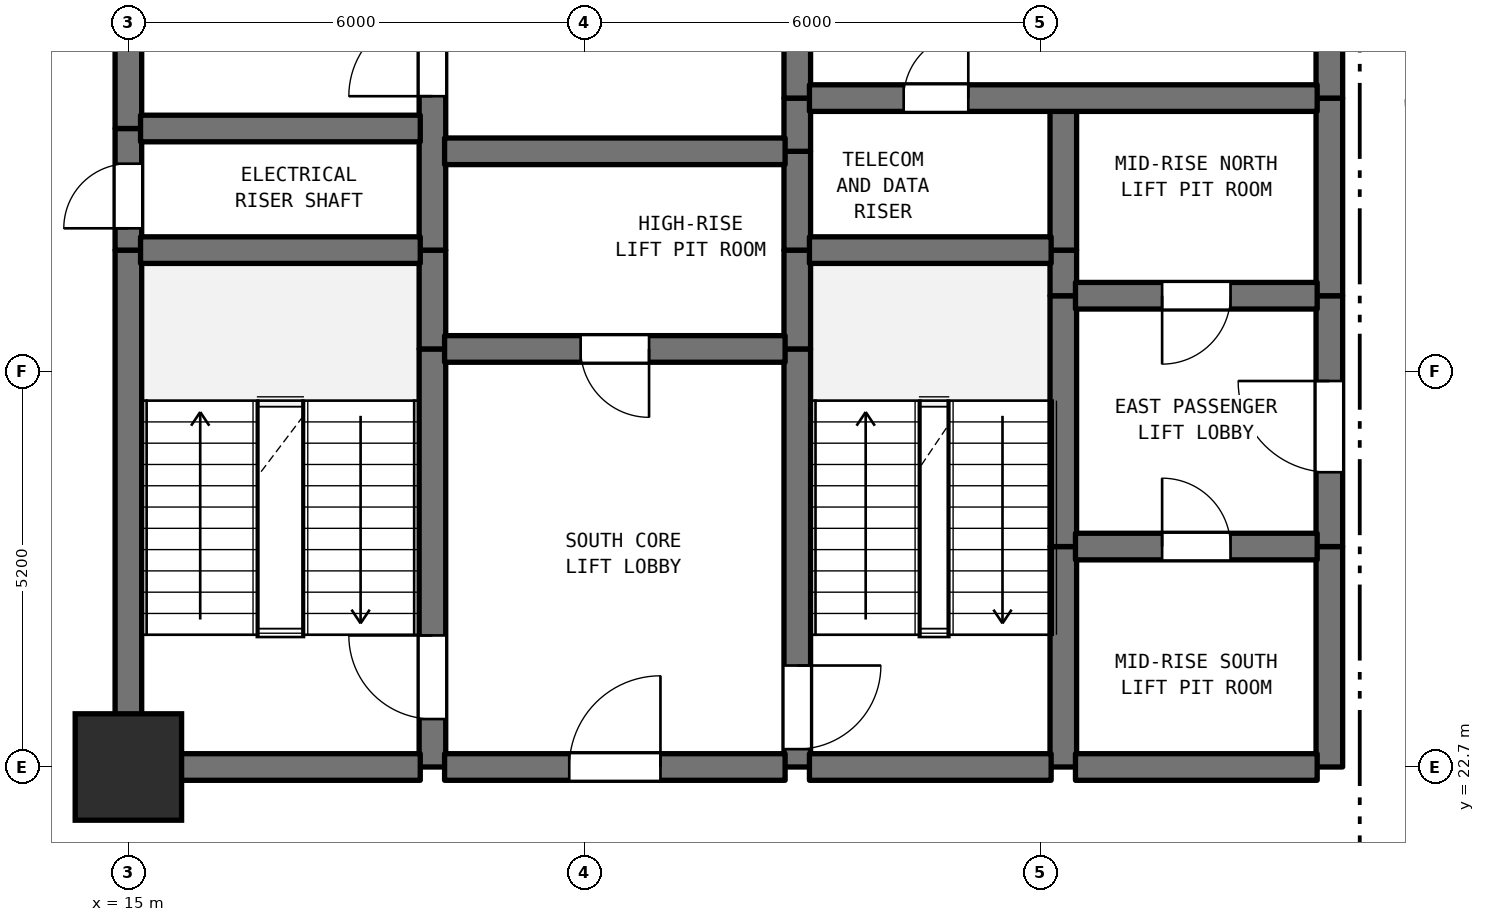
"""IFC4 building model, lengths in metres.
Left out: names, types, materials, properties, quantities, classifications, styles, units other than length and angle.
Written with IfcOpenShell. Run it as: python <this file> out.ifc"""

import sys

from ifc_helpers import new_model, si_unit, direction, frame, frame_2d, origin, origin_2d, place, context, subcontext, project, spatial, rectangle, extrude, element, fill, save


model = new_model("IFC4")
c1 = context("Model", 3, precision=1e-05, world=origin(), true_north=direction((0.0, 1.0)))
c2 = subcontext(c1, "Body", "Model", "MODEL_VIEW")
j1 = project(units=[si_unit("LENGTHUNIT", "METRE"), si_unit("PLANEANGLEUNIT", "RADIAN")], contexts=[c1])
p1 = place(None, origin())
s1 = spatial("IfcSite", under=j1, at=p1, CompositionType="ELEMENT")
p2 = place(p1, origin())
s2 = spatial("IfcBuilding", under=s1, at=p2, CompositionType="ELEMENT")
p3 = place(p2, frame((0.0, 0.0, -4.5)))
s3 = spatial("IfcBuildingStorey", under=s2, at=p3, CompositionType="ELEMENT", Elevation=-4.5)
p4 = place(p3, frame((15.0, 22.7, 0.0), z_axis=(0.0, 0.0, 1.0), x_axis=(1.0, 0.0, 0.0)))
e1 = element("IfcColumn", 1, at=p4, inside=s3, PredefinedType="COLUMN", context=c2, shape_type="SweptSolid", body=[
    extrude(rectangle(XDim=1.4, YDim=1.4, at=origin_2d()), origin(), (0.0, 0.0, 1.0), 4.5),
])
p5 = place(p3, frame((15.0, 22.7, 0.0), z_axis=(0.0, 0.0, 1.0), x_axis=(0.0, 1.0, 0.0)))
e2 = element("IfcWall", 2, at=p5, inside=s3, PredefinedType="SHEAR", context=c2, shape_type="SweptSolid", body=[
    extrude(rectangle(XDim=6.8, YDim=0.35, at=frame_2d((3.4, 0.0))), origin(), (0.0, 0.0, 1.0), 4.1),
])
p6 = place(p3, frame((15.0, 29.5, 0.0), z_axis=(0.0, 0.0, 1.0), x_axis=(0.0, 1.0, 0.0)))
e3 = element("IfcWall", 3, at=p6, inside=s3, PredefinedType="SHEAR", context=c2, shape_type="SweptSolid", body=[
    extrude(rectangle(XDim=1.6, YDim=0.35, at=frame_2d((0.8, 0.0))), origin(), (0.0, 0.0, 1.0), 4.1),
])
p7 = place(p6, frame((0.287, 0.0, 0.0)))
e4 = element("IfcOpeningElement", 4, at=p7, cuts=e3, PredefinedType="OPENING", context=c2, shape_type="SweptSolid", body=[
    extrude(rectangle(XDim=0.85, YDim=2.1, at=frame_2d((0.425, 1.05))), frame((0.0, 0.185, 0.0), z_axis=(0.0, -1.0, 0.0), x_axis=(1.0, 0.0, 0.0)), (0.0, 0.0, 1.0), 0.37),
])
p8 = place(p3, frame((15.0, 31.1, 0.0), z_axis=(0.0, 0.0, 1.0), x_axis=(0.0, 1.0, 0.0)))
e5 = element("IfcWall", 5, at=p8, inside=s3, PredefinedType="SHEAR", context=c2, shape_type="SweptSolid", body=[
    extrude(rectangle(XDim=6.8, YDim=0.35, at=frame_2d((3.4, 0.0))), origin(), (0.0, 0.0, 1.0), 4.1),
])
p9 = place(p3, frame((19.0, 22.7, 0.0), z_axis=(0.0, 0.0, 1.0), x_axis=(0.0, 1.0, 0.0)))
e6 = element("IfcWall", 6, at=p9, inside=s3, PredefinedType="SHEAR", context=c2, shape_type="SweptSolid", body=[
    extrude(rectangle(XDim=5.5, YDim=0.35, at=frame_2d((2.75, 0.0))), origin(), (0.0, 0.0, 1.0), 4.1),
])
p10 = place(p9, frame((0.631, 0.0, 0.0)))
e7 = element("IfcOpeningElement", 7, at=p10, cuts=e6, PredefinedType="OPENING", context=c2, shape_type="SweptSolid", body=[
    extrude(rectangle(XDim=1.1, YDim=2.15, at=frame_2d((0.55, 1.075))), frame((0.0, 0.185, 0.0), z_axis=(0.0, -1.0, 0.0), x_axis=(1.0, 0.0, 0.0)), (0.0, 0.0, 1.0), 0.37),
])
p11 = place(p3, frame((19.0, 28.2, 0.0), z_axis=(0.0, 0.0, 1.0), x_axis=(0.0, 1.0, 0.0)))
e8 = element("IfcWall", 8, at=p11, inside=s3, PredefinedType="SHEAR", context=c2, shape_type="SweptSolid", body=[
    extrude(rectangle(XDim=1.3, YDim=0.35, at=frame_2d((0.65, 0.0))), origin(), (0.0, 0.0, 1.0), 4.1),
])
p12 = place(p3, frame((19.0, 29.5, 0.0), z_axis=(0.0, 0.0, 1.0), x_axis=(0.0, 1.0, 0.0)))
e9 = element("IfcWall", 9, at=p12, inside=s3, PredefinedType="SHEAR", context=c2, shape_type="SweptSolid", body=[
    extrude(rectangle(XDim=5.5, YDim=0.35, at=frame_2d((2.75, 0.0))), origin(), (0.0, 0.0, 1.0), 4.1),
])
p13 = place(p12, frame((2.025, 0.0, 0.0)))
e10 = element("IfcOpeningElement", 10, at=p13, cuts=e9, PredefinedType="OPENING", context=c2, shape_type="SweptSolid", body=[
    extrude(rectangle(XDim=1.1, YDim=2.15, at=frame_2d((0.55, 1.075))), frame((0.0, 0.185, 0.0), z_axis=(0.0, -1.0, 0.0), x_axis=(1.0, 0.0, 0.0)), (0.0, 0.0, 1.0), 0.37),
])
p14 = place(p3, frame((23.8, 22.7, 0.0), z_axis=(0.0, 0.0, 1.0), x_axis=(0.0, 1.0, 0.0)))
e11 = element("IfcWall", 11, at=p14, inside=s3, PredefinedType="SHEAR", context=c2, shape_type="SweptSolid", body=[
    extrude(rectangle(XDim=5.5, YDim=0.35, at=frame_2d((2.75, 0.0))), origin(), (0.0, 0.0, 1.0), 4.1),
])
p15 = place(p14, frame((0.235, 0.0, 0.0)))
e12 = element("IfcOpeningElement", 12, at=p15, cuts=e11, PredefinedType="OPENING", context=c2, shape_type="SweptSolid", body=[
    extrude(rectangle(XDim=1.1, YDim=2.15, at=frame_2d((0.55, 1.075))), frame((0.0, 0.185, 0.0), z_axis=(0.0, -1.0, 0.0), x_axis=(1.0, 0.0, 0.0)), (0.0, 0.0, 1.0), 0.37),
])
for number, where, z_axis, x_axis in (
    (13, (23.8, 28.2, 0.0), (0.0, 0.0, 1.0), (0.0, 1.0, 0.0)),
    (14, (23.8, 29.5, 0.0), (0.0, 0.0, 1.0), (0.0, 1.0, 0.0)),
):
    element("IfcWall", number, at=place(p3, frame(where, z_axis=z_axis, x_axis=x_axis)), inside=s3, PredefinedType="SHEAR", context=c2, shape_type="SweptSolid", body=[
        extrude(rectangle(XDim=1.3, YDim=0.35, at=frame_2d((0.65, 0.0))), origin(), (0.0, 0.0, 1.0), 4.1),
    ])
p16 = place(p3, frame((23.8, 30.8, 0.0), z_axis=(0.0, 0.0, 1.0), x_axis=(0.0, 1.0, 0.0)))
e15 = element("IfcWall", 15, at=p16, inside=s3, PredefinedType="SHEAR", context=c2, shape_type="SweptSolid", body=[
    extrude(rectangle(XDim=0.7, YDim=0.35, at=frame_2d((0.35, 0.0))), origin(), (0.0, 0.0, 1.0), 4.1),
])
p17 = place(p3, frame((23.8, 31.5, 0.0), z_axis=(0.0, 0.0, 1.0), x_axis=(0.0, 1.0, 0.0)))
e16 = element("IfcWall", 16, at=p17, inside=s3, PredefinedType="SHEAR", context=c2, shape_type="SweptSolid", body=[
    extrude(rectangle(XDim=3.5, YDim=0.35, at=frame_2d((1.75, 0.0))), origin(), (0.0, 0.0, 1.0), 4.1),
])
p18 = place(p17, frame((1.127, 0.0, 0.0)))
e17 = element("IfcOpeningElement", 17, at=p18, cuts=e16, PredefinedType="OPENING", context=c2, shape_type="SweptSolid", body=[
    extrude(rectangle(XDim=1.1, YDim=2.15, at=frame_2d((0.55, 1.075))), frame((0.0, 0.185, 0.0), z_axis=(0.0, -1.0, 0.0), x_axis=(1.0, 0.0, 0.0)), (0.0, 0.0, 1.0), 0.37),
])
p19 = place(p3, frame((27.3, 22.7, 0.0), z_axis=(0.0, 0.0, 1.0), x_axis=(0.0, 1.0, 0.0)))
e18 = element("IfcWall", 18, at=p19, inside=s3, PredefinedType="SHEAR", context=c2, shape_type="SweptSolid", body=[
    extrude(rectangle(XDim=2.9, YDim=0.35, at=frame_2d((1.45, 0.0))), origin(), (0.0, 0.0, 1.0), 4.1),
])
p20 = place(p3, frame((27.3, 25.6, 0.0), z_axis=(0.0, 0.0, 1.0), x_axis=(0.0, 1.0, 0.0)))
e19 = element("IfcWall", 19, at=p20, inside=s3, PredefinedType="SHEAR", context=c2, shape_type="SweptSolid", body=[
    extrude(rectangle(XDim=3.3, YDim=0.35, at=frame_2d((1.65, 0.0))), origin(), (0.0, 0.0, 1.0), 4.1),
])
p21 = place(p3, frame((27.3, 28.9, 0.0), z_axis=(0.0, 0.0, 1.0), x_axis=(0.0, 1.0, 0.0)))
e20 = element("IfcWall", 20, at=p21, inside=s3, PredefinedType="SHEAR", context=c2, shape_type="SweptSolid", body=[
    extrude(rectangle(XDim=0.6, YDim=0.35, at=frame_2d((0.3, 0.0))), origin(), (0.0, 0.0, 1.0), 4.1),
])
p22 = place(p3, frame((27.3, 29.5, 0.0), z_axis=(0.0, 0.0, 1.0), x_axis=(0.0, 1.0, 0.0)))
e21 = element("IfcWall", 21, at=p22, inside=s3, PredefinedType="SHEAR", context=c2, shape_type="SweptSolid", body=[
    extrude(rectangle(XDim=2.0, YDim=0.35, at=frame_2d((1.0, 0.0))), origin(), (0.0, 0.0, 1.0), 4.1),
])
p23 = place(p3, frame((30.8, 22.7, 0.0), z_axis=(0.0, 0.0, 1.0), x_axis=(0.0, 1.0, 0.0)))
e22 = element("IfcWall", 22, at=p23, inside=s3, PredefinedType="SHEAR", context=c2, shape_type="SweptSolid", body=[
    extrude(rectangle(XDim=2.9, YDim=0.35, at=frame_2d((1.45, 0.0))), origin(), (0.0, 0.0, 1.0), 4.1),
])
p24 = place(p3, frame((30.8, 25.6, 0.0), z_axis=(0.0, 0.0, 1.0), x_axis=(0.0, 1.0, 0.0)))
e23 = element("IfcWall", 23, at=p24, inside=s3, PredefinedType="SHEAR", context=c2, shape_type="SweptSolid", body=[
    extrude(rectangle(XDim=3.3, YDim=0.35, at=frame_2d((1.65, 0.0))), origin(), (0.0, 0.0, 1.0), 4.1),
])
p25 = place(p24, frame((0.978, 0.0, 0.0)))
e24 = element("IfcOpeningElement", 24, at=p25, cuts=e23, PredefinedType="OPENING", context=c2, shape_type="SweptSolid", body=[
    extrude(rectangle(XDim=1.2, YDim=2.2, at=frame_2d((0.6, 1.1))), frame((0.0, 0.185, 0.0), z_axis=(0.0, -1.0, 0.0), x_axis=(1.0, 0.0, 0.0)), (0.0, 0.0, 1.0), 0.37),
])
p26 = place(p3, frame((30.8, 28.9, 0.0), z_axis=(0.0, 0.0, 1.0), x_axis=(0.0, 1.0, 0.0)))
e25 = element("IfcWall", 25, at=p26, inside=s3, PredefinedType="SHEAR", context=c2, shape_type="SweptSolid", body=[
    extrude(rectangle(XDim=2.6, YDim=0.35, at=frame_2d((1.3, 0.0))), origin(), (0.0, 0.0, 1.0), 4.1),
])
p27 = place(p3, frame((30.8, 31.5, 0.0), z_axis=(0.0, 0.0, 1.0), x_axis=(0.0, 1.0, 0.0)))
e26 = element("IfcWall", 26, at=p27, inside=s3, PredefinedType="SHEAR", context=c2, shape_type="SweptSolid", body=[
    extrude(rectangle(XDim=3.5, YDim=0.35, at=frame_2d((1.75, 0.0))), origin(), (0.0, 0.0, 1.0), 4.1),
])
p28 = place(p27, frame((1.15, 0.0, 0.0)))
e27 = element("IfcOpeningElement", 27, at=p28, cuts=e26, PredefinedType="OPENING", context=c2, shape_type="SweptSolid", body=[
    extrude(rectangle(XDim=1.2, YDim=2.2, at=frame_2d((0.6, 1.1))), frame((0.0, 0.185, 0.0), z_axis=(0.0, -1.0, 0.0), x_axis=(1.0, 0.0, 0.0)), (0.0, 0.0, 1.0), 0.37),
])
p29 = place(p3, frame((15.16, 22.7, 0.0), z_axis=(0.0, 0.0, 1.0), x_axis=(1.0, 0.0, 0.0)))
e28 = element("IfcWall", 28, at=p29, inside=s3, PredefinedType="SHEAR", context=c2, shape_type="SweptSolid", body=[
    extrude(rectangle(XDim=3.68, YDim=0.35, at=frame_2d((1.84, 0.0))), origin(), (0.0, 0.0, 1.0), 4.1),
])
p30 = place(p3, frame((19.16, 22.7, 0.0), z_axis=(0.0, 0.0, 1.0), x_axis=(1.0, 0.0, 0.0)))
e29 = element("IfcWall", 29, at=p30, inside=s3, PredefinedType="SHEAR", context=c2, shape_type="SweptSolid", body=[
    extrude(rectangle(XDim=4.48, YDim=0.35, at=frame_2d((2.24, 0.0))), origin(), (0.0, 0.0, 1.0), 4.1),
])
p31 = place(p30, frame((1.64, 0.0, 0.0)))
e30 = element("IfcOpeningElement", 30, at=p31, cuts=e29, PredefinedType="OPENING", context=c2, shape_type="SweptSolid", body=[
    extrude(rectangle(XDim=1.2, YDim=2.2, at=frame_2d((0.6, 1.1))), frame((0.0, 0.185, 0.0), z_axis=(0.0, -1.0, 0.0), x_axis=(1.0, 0.0, 0.0)), (0.0, 0.0, 1.0), 0.37),
])
for number, where, z_axis, x_axis in (
    (31, (23.96, 22.7, 0.0), (0.0, 0.0, 1.0), (1.0, 0.0, 0.0)),
    (32, (27.46, 22.7, 0.0), (0.0, 0.0, 1.0), (1.0, 0.0, 0.0)),
):
    element("IfcWall", number, at=place(p3, frame(where, z_axis=z_axis, x_axis=x_axis)), inside=s3, PredefinedType="SHEAR", context=c2, shape_type="SweptSolid", body=[
        extrude(rectangle(XDim=3.18, YDim=0.35, at=frame_2d((1.59, 0.0))), origin(), (0.0, 0.0, 1.0), 4.1),
    ])
p32 = place(p3, frame((27.46, 25.6, 0.0), z_axis=(0.0, 0.0, 1.0), x_axis=(1.0, 0.0, 0.0)))
e33 = element("IfcWall", 33, at=p32, inside=s3, PredefinedType="SHEAR", context=c2, shape_type="SweptSolid", body=[
    extrude(rectangle(XDim=3.18, YDim=0.35, at=frame_2d((1.59, 0.0))), origin(), (0.0, 0.0, 1.0), 4.1),
])
p33 = place(p32, frame((1.14, 0.0, 0.0)))
e34 = element("IfcOpeningElement", 34, at=p33, cuts=e33, PredefinedType="OPENING", context=c2, shape_type="SweptSolid", body=[
    extrude(rectangle(XDim=0.9, YDim=2.15, at=frame_2d((0.45, 1.075))), frame((0.0, 0.185, 0.0), z_axis=(0.0, -1.0, 0.0), x_axis=(1.0, 0.0, 0.0)), (0.0, 0.0, 1.0), 0.37),
])
p34 = place(p3, frame((19.16, 28.2, 0.0), z_axis=(0.0, 0.0, 1.0), x_axis=(1.0, 0.0, 0.0)))
e35 = element("IfcWall", 35, at=p34, inside=s3, PredefinedType="SHEAR", context=c2, shape_type="SweptSolid", body=[
    extrude(rectangle(XDim=4.48, YDim=0.35, at=frame_2d((2.24, 0.0))), origin(), (0.0, 0.0, 1.0), 4.1),
])
p35 = place(p34, frame((1.79, 0.0, 0.0)))
e36 = element("IfcOpeningElement", 36, at=p35, cuts=e35, PredefinedType="OPENING", context=c2, shape_type="SweptSolid", body=[
    extrude(rectangle(XDim=0.9, YDim=2.15, at=frame_2d((0.45, 1.075))), frame((0.0, 0.185, 0.0), z_axis=(0.0, -1.0, 0.0), x_axis=(1.0, 0.0, 0.0)), (0.0, 0.0, 1.0), 0.37),
])
p36 = place(p3, frame((27.46, 28.9, 0.0), z_axis=(0.0, 0.0, 1.0), x_axis=(1.0, 0.0, 0.0)))
e37 = element("IfcWall", 37, at=p36, inside=s3, PredefinedType="SHEAR", context=c2, shape_type="SweptSolid", body=[
    extrude(rectangle(XDim=3.18, YDim=0.35, at=frame_2d((1.59, 0.0))), origin(), (0.0, 0.0, 1.0), 4.1),
])
p37 = place(p36, frame((1.14, 0.0, 0.0)))
e38 = element("IfcOpeningElement", 38, at=p37, cuts=e37, PredefinedType="OPENING", context=c2, shape_type="SweptSolid", body=[
    extrude(rectangle(XDim=0.9, YDim=2.15, at=frame_2d((0.45, 1.075))), frame((0.0, 0.185, 0.0), z_axis=(0.0, -1.0, 0.0), x_axis=(1.0, 0.0, 0.0)), (0.0, 0.0, 1.0), 0.37),
])
p38 = place(p3, frame((15.16, 29.5, 0.0), z_axis=(0.0, 0.0, 1.0), x_axis=(1.0, 0.0, 0.0)))
e39 = element("IfcWall", 39, at=p38, inside=s3, PredefinedType="SHEAR", context=c2, shape_type="SweptSolid", body=[
    extrude(rectangle(XDim=3.68, YDim=0.35, at=frame_2d((1.84, 0.0))), origin(), (0.0, 0.0, 1.0), 4.1),
])
p39 = place(p3, frame((23.96, 29.5, 0.0), z_axis=(0.0, 0.0, 1.0), x_axis=(1.0, 0.0, 0.0)))
e40 = element("IfcWall", 40, at=p39, inside=s3, PredefinedType="SHEAR", context=c2, shape_type="SweptSolid", body=[
    extrude(rectangle(XDim=3.18, YDim=0.35, at=frame_2d((1.59, 0.0))), origin(), (0.0, 0.0, 1.0), 4.1),
])
p40 = place(p3, frame((19.16, 30.8, 0.0), z_axis=(0.0, 0.0, 1.0), x_axis=(1.0, 0.0, 0.0)))
e41 = element("IfcWall", 41, at=p40, inside=s3, PredefinedType="SHEAR", context=c2, shape_type="SweptSolid", body=[
    extrude(rectangle(XDim=4.48, YDim=0.35, at=frame_2d((2.24, 0.0))), origin(), (0.0, 0.0, 1.0), 4.1),
])
p41 = place(p3, frame((15.16, 31.1, 0.0), z_axis=(0.0, 0.0, 1.0), x_axis=(1.0, 0.0, 0.0)))
e42 = element("IfcWall", 42, at=p41, inside=s3, PredefinedType="SHEAR", context=c2, shape_type="SweptSolid", body=[
    extrude(rectangle(XDim=3.68, YDim=0.35, at=frame_2d((1.84, 0.0))), origin(), (0.0, 0.0, 1.0), 4.1),
])
p42 = place(p3, frame((23.96, 31.5, 0.0), z_axis=(0.0, 0.0, 1.0), x_axis=(1.0, 0.0, 0.0)))
e43 = element("IfcWall", 43, at=p42, inside=s3, PredefinedType="SHEAR", context=c2, shape_type="SweptSolid", body=[
    extrude(rectangle(XDim=6.68, YDim=0.35, at=frame_2d((3.34, 0.0))), origin(), (0.0, 0.0, 1.0), 4.1),
])
p43 = place(p42, frame((1.24, 0.0, 0.0)))
e44 = element("IfcOpeningElement", 44, at=p43, cuts=e43, PredefinedType="OPENING", context=c2, shape_type="SweptSolid", body=[
    extrude(rectangle(XDim=0.85, YDim=2.1, at=frame_2d((0.425, 1.05))), frame((0.0, 0.185, 0.0), z_axis=(0.0, -1.0, 0.0), x_axis=(1.0, 0.0, 0.0)), (0.0, 0.0, 1.0), 0.37),
])
p44 = place(p7, origin())
e45 = element("IfcDoor", 45, at=p44, inside=s3, OperationType="SINGLE_SWING_LEFT", PredefinedType="DOOR", context=c2, shape_type="SweptSolid", body=[
    extrude(rectangle(XDim=0.85, YDim=2.1, at=frame_2d((0.425, 1.05))), frame((0.0, 0.025, 0.0), z_axis=(0.0, -1.0, 0.0), x_axis=(1.0, 0.0, 0.0)), (0.0, 0.0, 1.0), 0.05),
])
fill(e4, e45)
p45 = place(p10, origin())
e46 = element("IfcDoor", 46, at=p45, inside=s3, OperationType="SINGLE_SWING_RIGHT", PredefinedType="DOOR", context=c2, shape_type="SweptSolid", body=[
    extrude(rectangle(XDim=1.1, YDim=2.15, at=frame_2d((0.55, 1.075))), frame((0.0, 0.025, 0.0), z_axis=(0.0, -1.0, 0.0), x_axis=(1.0, 0.0, 0.0)), (0.0, 0.0, 1.0), 0.05),
])
fill(e7, e46)
p46 = place(p13, origin())
e47 = element("IfcDoor", 47, at=p46, inside=s3, OperationType="SINGLE_SWING_LEFT", PredefinedType="DOOR", context=c2, shape_type="SweptSolid", body=[
    extrude(rectangle(XDim=1.1, YDim=2.15, at=frame_2d((0.55, 1.075))), frame((0.0, 0.025, 0.0), z_axis=(0.0, -1.0, 0.0), x_axis=(1.0, 0.0, 0.0)), (0.0, 0.0, 1.0), 0.05),
])
fill(e10, e47)
p47 = place(p15, frame((1.1, 0.0, 0.0), z_axis=(0.0, 0.0, 1.0), x_axis=(-1.0, 0.0, 0.0)))
e48 = element("IfcDoor", 48, at=p47, inside=s3, OperationType="SINGLE_SWING_RIGHT", PredefinedType="DOOR", context=c2, shape_type="SweptSolid", body=[
    extrude(rectangle(XDim=1.1, YDim=2.15, at=frame_2d((0.55, 1.075))), frame((0.0, 0.025, 0.0), z_axis=(0.0, -1.0, 0.0), x_axis=(1.0, 0.0, 0.0)), (0.0, 0.0, 1.0), 0.05),
])
fill(e12, e48)
p48 = place(p25, origin())
e49 = element("IfcDoor", 49, at=p48, inside=s3, OperationType="SINGLE_SWING_RIGHT", PredefinedType="DOOR", context=c2, shape_type="SweptSolid", body=[
    extrude(rectangle(XDim=1.2, YDim=2.2, at=frame_2d((0.6, 1.1))), frame((0.0, 0.025, 0.0), z_axis=(0.0, -1.0, 0.0), x_axis=(1.0, 0.0, 0.0)), (0.0, 0.0, 1.0), 0.05),
])
fill(e24, e49)
p49 = place(p31, origin())
e50 = element("IfcDoor", 50, at=p49, inside=s3, OperationType="SINGLE_SWING_RIGHT", PredefinedType="DOOR", context=c2, shape_type="SweptSolid", body=[
    extrude(rectangle(XDim=1.2, YDim=2.2, at=frame_2d((0.6, 1.1))), frame((0.0, 0.025, 0.0), z_axis=(0.0, -1.0, 0.0), x_axis=(1.0, 0.0, 0.0)), (0.0, 0.0, 1.0), 0.05),
])
fill(e30, e50)
p50 = place(p33, origin())
e51 = element("IfcDoor", 51, at=p50, inside=s3, OperationType="SINGLE_SWING_LEFT", PredefinedType="DOOR", context=c2, shape_type="SweptSolid", body=[
    extrude(rectangle(XDim=0.9, YDim=2.15, at=frame_2d((0.45, 1.075))), frame((0.0, 0.025, 0.0), z_axis=(0.0, -1.0, 0.0), x_axis=(1.0, 0.0, 0.0)), (0.0, 0.0, 1.0), 0.05),
])
fill(e34, e51)
p51 = place(p35, frame((0.9, 0.0, 0.0), z_axis=(0.0, 0.0, 1.0), x_axis=(-1.0, 0.0, 0.0)))
e52 = element("IfcDoor", 52, at=p51, inside=s3, OperationType="SINGLE_SWING_RIGHT", PredefinedType="DOOR", context=c2, shape_type="SweptSolid", body=[
    extrude(rectangle(XDim=0.9, YDim=2.15, at=frame_2d((0.45, 1.075))), frame((0.0, 0.025, 0.0), z_axis=(0.0, -1.0, 0.0), x_axis=(1.0, 0.0, 0.0)), (0.0, 0.0, 1.0), 0.05),
])
fill(e36, e52)
p52 = place(p37, frame((0.9, 0.0, 0.0), z_axis=(0.0, 0.0, 1.0), x_axis=(-1.0, 0.0, 0.0)))
e53 = element("IfcDoor", 53, at=p52, inside=s3, OperationType="SINGLE_SWING_LEFT", PredefinedType="DOOR", context=c2, shape_type="SweptSolid", body=[
    extrude(rectangle(XDim=0.9, YDim=2.15, at=frame_2d((0.45, 1.075))), frame((0.0, 0.025, 0.0), z_axis=(0.0, -1.0, 0.0), x_axis=(1.0, 0.0, 0.0)), (0.0, 0.0, 1.0), 0.05),
])
fill(e38, e53)
p53 = place(p43, origin())
e54 = element("IfcDoor", 54, at=p53, inside=s3, OperationType="SINGLE_SWING_RIGHT", PredefinedType="DOOR", context=c2, shape_type="SweptSolid", body=[
    extrude(rectangle(XDim=0.85, YDim=2.1, at=frame_2d((0.425, 1.05))), frame((0.0, 0.025, 0.0), z_axis=(0.0, -1.0, 0.0), x_axis=(1.0, 0.0, 0.0)), (0.0, 0.0, 1.0), 0.05),
])
fill(e44, e54)
save(model, sys.argv[1])
